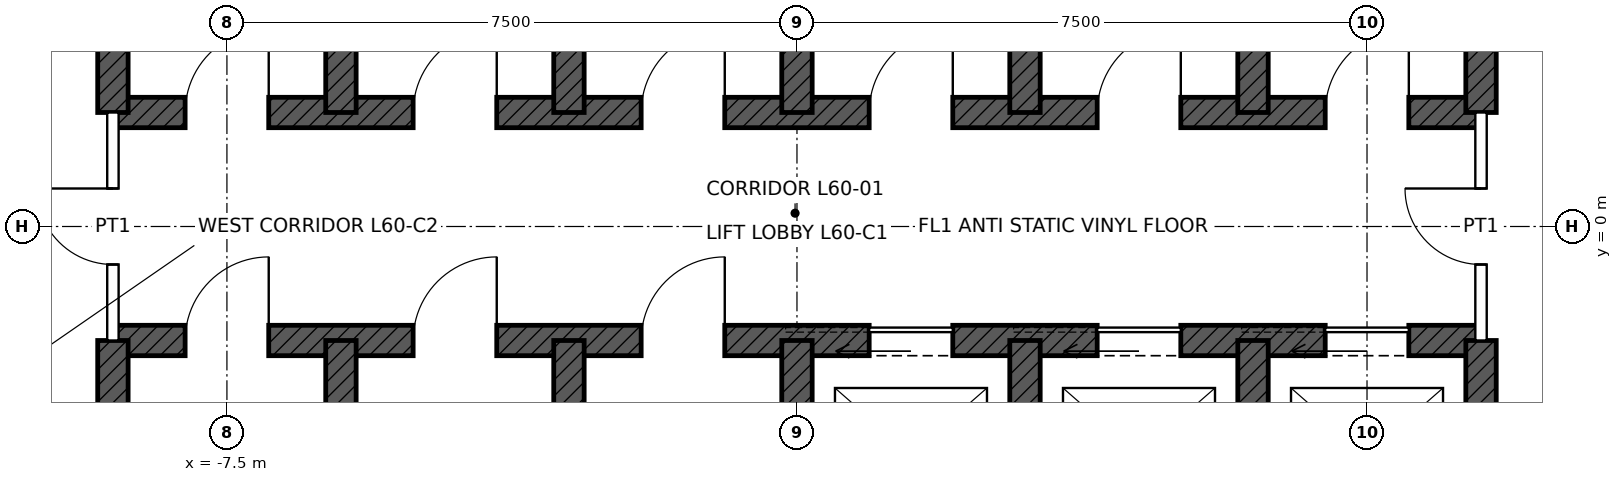
"""IFC4 building model, lengths in metres.
Left out: names, types, materials, properties, quantities, classifications, styles, units other than length and angle.
Written with IfcOpenShell. Run it as: python <this file> out.ifc"""

import sys

from ifc_helpers import new_model, si_unit, direction, frame, frame_2d, origin, place, context, subcontext, project, spatial, rectangle, extrude, element, fill, save


model = new_model("IFC4")
c1 = context("Model", 3, precision=1e-05, world=origin(), true_north=direction((0.0, 1.0)))
c2 = subcontext(c1, "Body", "Model", "MODEL_VIEW")
j1 = project(units=[si_unit("LENGTHUNIT", "METRE"), si_unit("PLANEANGLEUNIT", "RADIAN")], contexts=[c1])
p1 = place(None, origin())
s1 = spatial("IfcSite", under=j1, at=p1, CompositionType="ELEMENT")
p2 = place(p1, origin())
s2 = spatial("IfcBuilding", under=s1, at=p2, CompositionType="ELEMENT")
p3 = place(p2, frame((0.0, 0.0, 275.9)))
s3 = spatial("IfcBuildingStorey", under=s2, at=p3, CompositionType="ELEMENT", Elevation=275.9)
p4 = place(p3, frame((-9.0, 1.5, 0.0), z_axis=(0.0, 0.0, 1.0), x_axis=(1.0, 0.0, 0.0)))
e1 = element("IfcWall", 1, at=p4, inside=s3, PredefinedType="SHEAR", context=c2, shape_type="SweptSolid", body=[
    extrude(rectangle(XDim=18.0, YDim=0.4, at=frame_2d((9.0, 0.0))), origin(), (0.0, 0.0, 1.0), 4.0),
])
p5 = place(p4, frame((0.95, 0.0, 0.0)))
e2 = element("IfcOpeningElement", 2, at=p5, cuts=e1, PredefinedType="OPENING", context=c2, shape_type="SweptSolid", body=[
    extrude(rectangle(XDim=1.1, YDim=2.1, at=frame_2d((0.55, 1.05))), frame((0.0, 0.21, 0.0), z_axis=(0.0, -1.0, 0.0), x_axis=(1.0, 0.0, 0.0)), (0.0, 0.0, 1.0), 0.42),
])
p6 = place(p4, frame((3.95, 0.0, 0.0)))
e3 = element("IfcOpeningElement", 3, at=p6, cuts=e1, PredefinedType="OPENING", context=c2, shape_type="SweptSolid", body=[
    extrude(rectangle(XDim=1.1, YDim=2.1, at=frame_2d((0.55, 1.05))), frame((0.0, 0.21, 0.0), z_axis=(0.0, -1.0, 0.0), x_axis=(1.0, 0.0, 0.0)), (0.0, 0.0, 1.0), 0.42),
])
p7 = place(p4, frame((6.95, 0.0, 0.0)))
e4 = element("IfcOpeningElement", 4, at=p7, cuts=e1, PredefinedType="OPENING", context=c2, shape_type="SweptSolid", body=[
    extrude(rectangle(XDim=1.1, YDim=2.1, at=frame_2d((0.55, 1.05))), frame((0.0, 0.21, 0.0), z_axis=(0.0, -1.0, 0.0), x_axis=(1.0, 0.0, 0.0)), (0.0, 0.0, 1.0), 0.42),
])
p8 = place(p4, frame((9.95, 0.0, 0.0)))
e5 = element("IfcOpeningElement", 5, at=p8, cuts=e1, PredefinedType="OPENING", context=c2, shape_type="SweptSolid", body=[
    extrude(rectangle(XDim=1.1, YDim=2.1, at=frame_2d((0.55, 1.05))), frame((0.0, 0.21, 0.0), z_axis=(0.0, -1.0, 0.0), x_axis=(1.0, 0.0, 0.0)), (0.0, 0.0, 1.0), 0.42),
])
p9 = place(p4, frame((12.95, 0.0, 0.0)))
e6 = element("IfcOpeningElement", 6, at=p9, cuts=e1, PredefinedType="OPENING", context=c2, shape_type="SweptSolid", body=[
    extrude(rectangle(XDim=1.1, YDim=2.1, at=frame_2d((0.55, 1.05))), frame((0.0, 0.21, 0.0), z_axis=(0.0, -1.0, 0.0), x_axis=(1.0, 0.0, 0.0)), (0.0, 0.0, 1.0), 0.42),
])
p10 = place(p4, frame((15.95, 0.0, 0.0)))
e7 = element("IfcOpeningElement", 7, at=p10, cuts=e1, PredefinedType="OPENING", context=c2, shape_type="SweptSolid", body=[
    extrude(rectangle(XDim=1.1, YDim=2.1, at=frame_2d((0.55, 1.05))), frame((0.0, 0.21, 0.0), z_axis=(0.0, -1.0, 0.0), x_axis=(1.0, 0.0, 0.0)), (0.0, 0.0, 1.0), 0.42),
])
p11 = place(p3, frame((-9.0, -1.5, 0.0), z_axis=(0.0, 0.0, 1.0), x_axis=(1.0, 0.0, 0.0)))
e8 = element("IfcWall", 8, at=p11, inside=s3, PredefinedType="SHEAR", context=c2, shape_type="SweptSolid", body=[
    extrude(rectangle(XDim=18.0, YDim=0.4, at=frame_2d((9.0, 0.0))), origin(), (0.0, 0.0, 1.0), 4.0),
])
p12 = place(p11, frame((9.95, 0.0, 0.0)))
e9 = element("IfcOpeningElement", 9, at=p12, cuts=e8, PredefinedType="OPENING", context=c2, shape_type="SweptSolid", body=[
    extrude(rectangle(XDim=1.1, YDim=2.1, at=frame_2d((0.55, 1.05))), frame((0.0, 0.21, 0.0), z_axis=(0.0, -1.0, 0.0), x_axis=(1.0, 0.0, 0.0)), (0.0, 0.0, 1.0), 0.42),
])
p13 = place(p11, frame((12.95, 0.0, 0.0)))
e10 = element("IfcOpeningElement", 10, at=p13, cuts=e8, PredefinedType="OPENING", context=c2, shape_type="SweptSolid", body=[
    extrude(rectangle(XDim=1.1, YDim=2.1, at=frame_2d((0.55, 1.05))), frame((0.0, 0.21, 0.0), z_axis=(0.0, -1.0, 0.0), x_axis=(1.0, 0.0, 0.0)), (0.0, 0.0, 1.0), 0.42),
])
p14 = place(p11, frame((15.95, 0.0, 0.0)))
e11 = element("IfcOpeningElement", 11, at=p14, cuts=e8, PredefinedType="OPENING", context=c2, shape_type="SweptSolid", body=[
    extrude(rectangle(XDim=1.1, YDim=2.1, at=frame_2d((0.55, 1.05))), frame((0.0, 0.21, 0.0), z_axis=(0.0, -1.0, 0.0), x_axis=(1.0, 0.0, 0.0)), (0.0, 0.0, 1.0), 0.42),
])
p15 = place(p11, frame((0.95, 0.0, 0.0)))
e12 = element("IfcOpeningElement", 12, at=p15, cuts=e8, PredefinedType="OPENING", context=c2, shape_type="SweptSolid", body=[
    extrude(rectangle(XDim=1.1, YDim=2.1, at=frame_2d((0.55, 1.05))), frame((0.0, 0.21, 0.0), z_axis=(0.0, -1.0, 0.0), x_axis=(1.0, 0.0, 0.0)), (0.0, 0.0, 1.0), 0.42),
])
p16 = place(p11, frame((3.95, 0.0, 0.0)))
e13 = element("IfcOpeningElement", 13, at=p16, cuts=e8, PredefinedType="OPENING", context=c2, shape_type="SweptSolid", body=[
    extrude(rectangle(XDim=1.1, YDim=2.1, at=frame_2d((0.55, 1.05))), frame((0.0, 0.21, 0.0), z_axis=(0.0, -1.0, 0.0), x_axis=(1.0, 0.0, 0.0)), (0.0, 0.0, 1.0), 0.42),
])
p17 = place(p11, frame((6.95, 0.0, 0.0)))
e14 = element("IfcOpeningElement", 14, at=p17, cuts=e8, PredefinedType="OPENING", context=c2, shape_type="SweptSolid", body=[
    extrude(rectangle(XDim=1.1, YDim=2.1, at=frame_2d((0.55, 1.05))), frame((0.0, 0.21, 0.0), z_axis=(0.0, -1.0, 0.0), x_axis=(1.0, 0.0, 0.0)), (0.0, 0.0, 1.0), 0.42),
])
for number, where, z_axis, x_axis in (
    (15, (-9.0, 1.5, 0.0), (0.0, 0.0, 1.0), (0.0, 1.0, 0.0)),
    (16, (9.0, 1.5, 0.0), (0.0, 0.0, 1.0), (0.0, 1.0, 0.0)),
    (17, (-9.0, -4.5, 0.0), (0.0, 0.0, 1.0), (0.0, 1.0, 0.0)),
    (18, (9.0, -4.5, 0.0), (0.0, 0.0, 1.0), (0.0, 1.0, 0.0)),
    (19, (-6.0, 1.5, 0.0), (0.0, 0.0, 1.0), (0.0, 1.0, 0.0)),
    (20, (-3.0, 1.5, 0.0), (0.0, 0.0, 1.0), (0.0, 1.0, 0.0)),
    (21, (0.0, 1.5, 0.0), (0.0, 0.0, 1.0), (0.0, 1.0, 0.0)),
    (22, (3.0, 1.5, 0.0), (0.0, 0.0, 1.0), (0.0, 1.0, 0.0)),
    (23, (6.0, 1.5, 0.0), (0.0, 0.0, 1.0), (0.0, 1.0, 0.0)),
    (24, (-6.0, -4.5, 0.0), (0.0, 0.0, 1.0), (0.0, 1.0, 0.0)),
    (25, (-3.0, -4.5, 0.0), (0.0, 0.0, 1.0), (0.0, 1.0, 0.0)),
    (26, (0.0, -4.5, 0.0), (0.0, 0.0, 1.0), (0.0, 1.0, 0.0)),
    (27, (3.0, -4.5, 0.0), (0.0, 0.0, 1.0), (0.0, 1.0, 0.0)),
    (28, (6.0, -4.5, 0.0), (0.0, 0.0, 1.0), (0.0, 1.0, 0.0)),
):
    element("IfcWall", number, at=place(p3, frame(where, z_axis=z_axis, x_axis=x_axis)), inside=s3, PredefinedType="SHEAR", context=c2, shape_type="SweptSolid", body=[
        extrude(rectangle(XDim=3.0, YDim=0.4, at=frame_2d((1.5, 0.0))), origin(), (0.0, 0.0, 1.0), 4.0),
    ])
p18 = place(p3, frame((-9.0, -1.5, 0.0), z_axis=(0.0, 0.0, 1.0), x_axis=(0.0, 1.0, 0.0)))
e29 = element("IfcWall", 29, at=p18, inside=s3, PredefinedType="PARTITIONING", context=c2, shape_type="SweptSolid", body=[
    extrude(rectangle(XDim=3.0, YDim=0.15, at=frame_2d((1.5, 0.0))), origin(), (0.0, 0.0, 1.0), 3.75),
])
p19 = place(p18, frame((1.0, 0.0, 0.0)))
e30 = element("IfcOpeningElement", 30, at=p19, cuts=e29, PredefinedType="OPENING", context=c2, shape_type="SweptSolid", body=[
    extrude(rectangle(XDim=1.0, YDim=2.4, at=frame_2d((0.5, 1.2))), frame((0.0, 0.085, 0.0), z_axis=(0.0, -1.0, 0.0), x_axis=(1.0, 0.0, 0.0)), (0.0, 0.0, 1.0), 0.17),
])
p20 = place(p3, frame((9.0, -1.5, 0.0), z_axis=(0.0, 0.0, 1.0), x_axis=(0.0, 1.0, 0.0)))
e31 = element("IfcWall", 31, at=p20, inside=s3, PredefinedType="PARTITIONING", context=c2, shape_type="SweptSolid", body=[
    extrude(rectangle(XDim=3.0, YDim=0.15, at=frame_2d((1.5, 0.0))), origin(), (0.0, 0.0, 1.0), 3.75),
])
p21 = place(p20, frame((1.0, 0.0, 0.0)))
e32 = element("IfcOpeningElement", 32, at=p21, cuts=e31, PredefinedType="OPENING", context=c2, shape_type="SweptSolid", body=[
    extrude(rectangle(XDim=1.0, YDim=2.4, at=frame_2d((0.5, 1.2))), frame((0.0, 0.085, 0.0), z_axis=(0.0, -1.0, 0.0), x_axis=(1.0, 0.0, 0.0)), (0.0, 0.0, 1.0), 0.17),
])
p22 = place(p12, origin())
e33 = element("IfcDoor", 33, at=p22, inside=s3, OperationType="SLIDING_TO_LEFT", PredefinedType="DOOR", context=c2, shape_type="SweptSolid", body=[
    extrude(rectangle(XDim=1.1, YDim=2.1, at=frame_2d((0.55, 1.05))), frame((0.0, 0.025, 0.0), z_axis=(0.0, -1.0, 0.0), x_axis=(1.0, 0.0, 0.0)), (0.0, 0.0, 1.0), 0.05),
])
fill(e9, e33)
p23 = place(p13, origin())
e34 = element("IfcDoor", 34, at=p23, inside=s3, OperationType="SLIDING_TO_LEFT", PredefinedType="DOOR", context=c2, shape_type="SweptSolid", body=[
    extrude(rectangle(XDim=1.1, YDim=2.1, at=frame_2d((0.55, 1.05))), frame((0.0, 0.025, 0.0), z_axis=(0.0, -1.0, 0.0), x_axis=(1.0, 0.0, 0.0)), (0.0, 0.0, 1.0), 0.05),
])
fill(e10, e34)
p24 = place(p14, origin())
e35 = element("IfcDoor", 35, at=p24, inside=s3, OperationType="SLIDING_TO_LEFT", PredefinedType="DOOR", context=c2, shape_type="SweptSolid", body=[
    extrude(rectangle(XDim=1.1, YDim=2.1, at=frame_2d((0.55, 1.05))), frame((0.0, 0.025, 0.0), z_axis=(0.0, -1.0, 0.0), x_axis=(1.0, 0.0, 0.0)), (0.0, 0.0, 1.0), 0.05),
])
fill(e11, e35)
p25 = place(p19, origin())
e36 = element("IfcDoor", 36, at=p25, inside=s3, OperationType="SINGLE_SWING_RIGHT", PredefinedType="DOOR", context=c2, shape_type="SweptSolid", body=[
    extrude(rectangle(XDim=1.0, YDim=2.4, at=frame_2d((0.5, 1.2))), frame((0.0, 0.025, 0.0), z_axis=(0.0, -1.0, 0.0), x_axis=(1.0, 0.0, 0.0)), (0.0, 0.0, 1.0), 0.05),
])
fill(e30, e36)
p26 = place(p21, origin())
e37 = element("IfcDoor", 37, at=p26, inside=s3, OperationType="SINGLE_SWING_RIGHT", PredefinedType="DOOR", context=c2, shape_type="SweptSolid", body=[
    extrude(rectangle(XDim=1.0, YDim=2.4, at=frame_2d((0.5, 1.2))), frame((0.0, 0.025, 0.0), z_axis=(0.0, -1.0, 0.0), x_axis=(1.0, 0.0, 0.0)), (0.0, 0.0, 1.0), 0.05),
])
fill(e32, e37)
p27 = place(p5, origin())
e38 = element("IfcDoor", 38, at=p27, inside=s3, OperationType="SINGLE_SWING_RIGHT", PredefinedType="DOOR", context=c2, shape_type="SweptSolid", body=[
    extrude(rectangle(XDim=1.1, YDim=2.1, at=frame_2d((0.55, 1.05))), frame((0.0, 0.025, 0.0), z_axis=(0.0, -1.0, 0.0), x_axis=(1.0, 0.0, 0.0)), (0.0, 0.0, 1.0), 0.05),
])
fill(e2, e38)
p28 = place(p6, origin())
e39 = element("IfcDoor", 39, at=p28, inside=s3, OperationType="SINGLE_SWING_RIGHT", PredefinedType="DOOR", context=c2, shape_type="SweptSolid", body=[
    extrude(rectangle(XDim=1.1, YDim=2.1, at=frame_2d((0.55, 1.05))), frame((0.0, 0.025, 0.0), z_axis=(0.0, -1.0, 0.0), x_axis=(1.0, 0.0, 0.0)), (0.0, 0.0, 1.0), 0.05),
])
fill(e3, e39)
p29 = place(p7, origin())
e40 = element("IfcDoor", 40, at=p29, inside=s3, OperationType="SINGLE_SWING_RIGHT", PredefinedType="DOOR", context=c2, shape_type="SweptSolid", body=[
    extrude(rectangle(XDim=1.1, YDim=2.1, at=frame_2d((0.55, 1.05))), frame((0.0, 0.025, 0.0), z_axis=(0.0, -1.0, 0.0), x_axis=(1.0, 0.0, 0.0)), (0.0, 0.0, 1.0), 0.05),
])
fill(e4, e40)
p30 = place(p8, origin())
e41 = element("IfcDoor", 41, at=p30, inside=s3, OperationType="SINGLE_SWING_RIGHT", PredefinedType="DOOR", context=c2, shape_type="SweptSolid", body=[
    extrude(rectangle(XDim=1.1, YDim=2.1, at=frame_2d((0.55, 1.05))), frame((0.0, 0.025, 0.0), z_axis=(0.0, -1.0, 0.0), x_axis=(1.0, 0.0, 0.0)), (0.0, 0.0, 1.0), 0.05),
])
fill(e5, e41)
p31 = place(p9, origin())
e42 = element("IfcDoor", 42, at=p31, inside=s3, OperationType="SINGLE_SWING_RIGHT", PredefinedType="DOOR", context=c2, shape_type="SweptSolid", body=[
    extrude(rectangle(XDim=1.1, YDim=2.1, at=frame_2d((0.55, 1.05))), frame((0.0, 0.025, 0.0), z_axis=(0.0, -1.0, 0.0), x_axis=(1.0, 0.0, 0.0)), (0.0, 0.0, 1.0), 0.05),
])
fill(e6, e42)
p32 = place(p10, origin())
e43 = element("IfcDoor", 43, at=p32, inside=s3, OperationType="SINGLE_SWING_RIGHT", PredefinedType="DOOR", context=c2, shape_type="SweptSolid", body=[
    extrude(rectangle(XDim=1.1, YDim=2.1, at=frame_2d((0.55, 1.05))), frame((0.0, 0.025, 0.0), z_axis=(0.0, -1.0, 0.0), x_axis=(1.0, 0.0, 0.0)), (0.0, 0.0, 1.0), 0.05),
])
fill(e7, e43)
p33 = place(p15, origin())
e44 = element("IfcDoor", 44, at=p33, inside=s3, OperationType="SINGLE_SWING_RIGHT", PredefinedType="DOOR", context=c2, shape_type="SweptSolid", body=[
    extrude(rectangle(XDim=1.1, YDim=2.1, at=frame_2d((0.55, 1.05))), frame((0.0, 0.025, 0.0), z_axis=(0.0, -1.0, 0.0), x_axis=(1.0, 0.0, 0.0)), (0.0, 0.0, 1.0), 0.05),
])
fill(e12, e44)
p34 = place(p16, origin())
e45 = element("IfcDoor", 45, at=p34, inside=s3, OperationType="SINGLE_SWING_RIGHT", PredefinedType="DOOR", context=c2, shape_type="SweptSolid", body=[
    extrude(rectangle(XDim=1.1, YDim=2.1, at=frame_2d((0.55, 1.05))), frame((0.0, 0.025, 0.0), z_axis=(0.0, -1.0, 0.0), x_axis=(1.0, 0.0, 0.0)), (0.0, 0.0, 1.0), 0.05),
])
fill(e13, e45)
p35 = place(p17, origin())
e46 = element("IfcDoor", 46, at=p35, inside=s3, OperationType="SINGLE_SWING_RIGHT", PredefinedType="DOOR", context=c2, shape_type="SweptSolid", body=[
    extrude(rectangle(XDim=1.1, YDim=2.1, at=frame_2d((0.55, 1.05))), frame((0.0, 0.025, 0.0), z_axis=(0.0, -1.0, 0.0), x_axis=(1.0, 0.0, 0.0)), (0.0, 0.0, 1.0), 0.05),
])
fill(e14, e46)
save(model, sys.argv[1])
